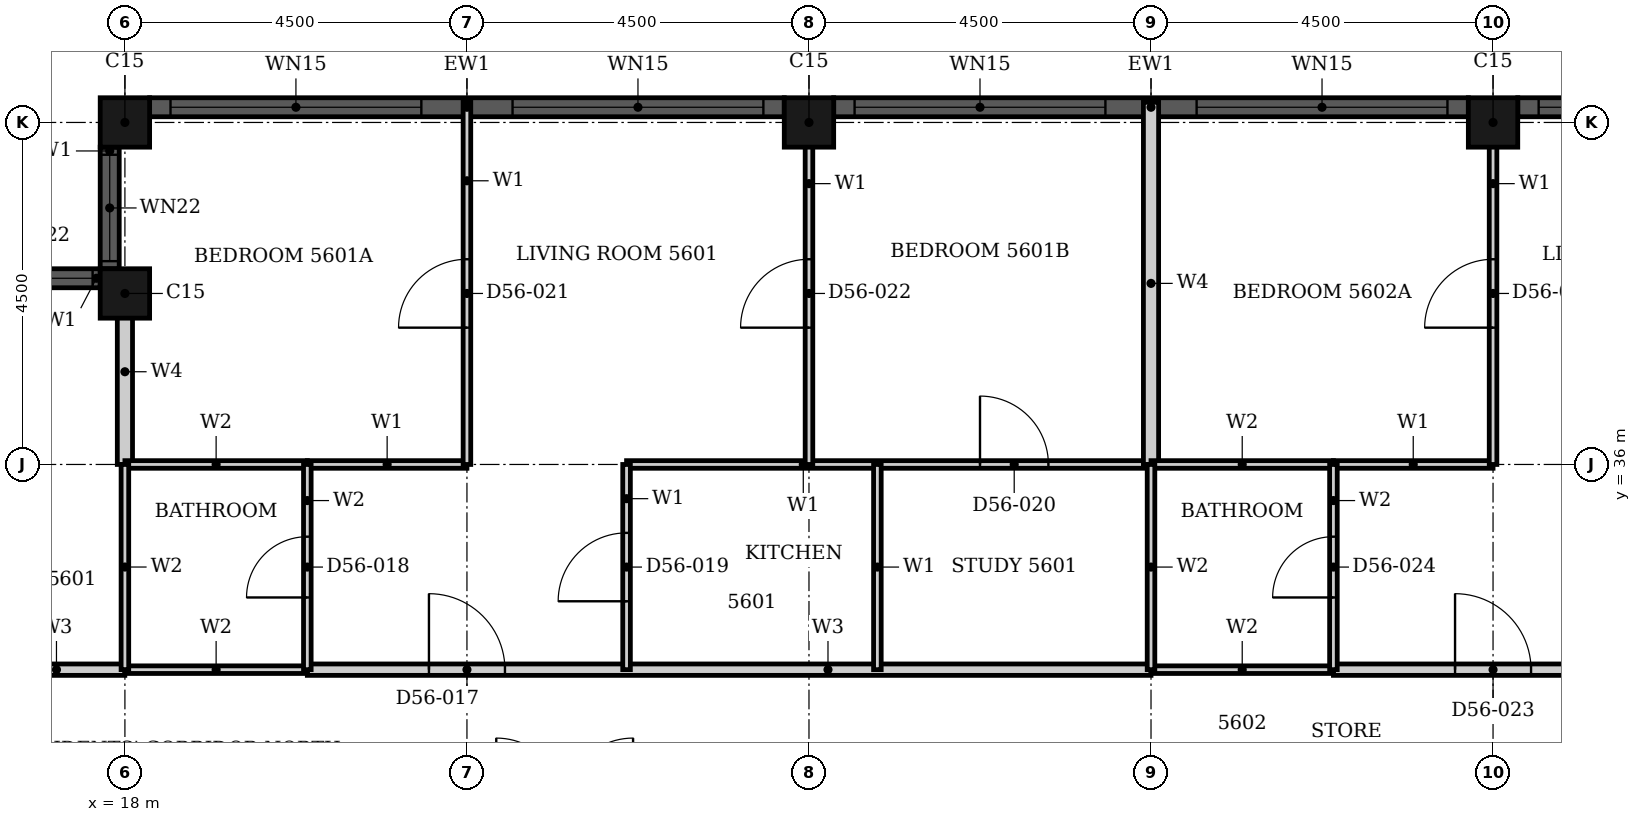
"""IFC4 building model, lengths in metres.
Left out: names, types, materials, properties, quantities, classifications, styles, units other than length and angle.
Written with IfcOpenShell. Run it as: python <this file> out.ifc"""

import sys

from ifc_helpers import new_model, si_unit, direction, frame, frame_2d, origin, origin_2d, place, context, subcontext, project, spatial, rectangle, hollow_rectangle, extrude, element, fill, save


model = new_model("IFC4")
c1 = context("Model", 3, precision=1e-05, world=origin(), true_north=direction((0.0, 1.0)))
c2 = subcontext(c1, "Body", "Model", "MODEL_VIEW")
j1 = project(units=[si_unit("LENGTHUNIT", "METRE"), si_unit("PLANEANGLEUNIT", "RADIAN")], contexts=[c1])
p1 = place(None, origin())
s1 = spatial("IfcSite", under=j1, at=p1, CompositionType="ELEMENT")
p2 = place(p1, origin())
s2 = spatial("IfcBuilding", under=s1, at=p2, CompositionType="ELEMENT")
p3 = place(p2, frame((0.0, 0.0, 222.0)))
s3 = spatial("IfcBuildingStorey", under=s2, at=p3, CompositionType="ELEMENT", Elevation=222.0)
for number, where, z_axis, x_axis in (
    (1, (36.0, 40.5, 0.0), (0.0, 0.0, 1.0), (1.0, 0.0, 0.0)),
    (2, (27.0, 40.5, 0.0), (0.0, 0.0, 1.0), (1.0, 0.0, 0.0)),
    (3, (18.0, 40.5, 0.0), (0.0, 0.0, 1.0), (1.0, 0.0, 0.0)),
    (4, (18.0, 38.25, 0.0), (0.0, 0.0, 1.0), (1.0, 0.0, 0.0)),
):
    element("IfcColumn", number, at=place(p3, frame(where, z_axis=z_axis, x_axis=x_axis)), inside=s3, PredefinedType="COLUMN", context=c2, shape_type="SweptSolid", body=[
        extrude(hollow_rectangle(XDim=0.65, YDim=0.65, WallThickness=0.021, at=origin_2d()), origin(), (0.0, 0.0, 1.0), 3.7),
    ])
p4 = place(p3, frame((44.675, 40.7, 0.0), z_axis=(0.0, 0.0, 1.0), x_axis=(-1.0, 0.0, 0.0)))
e5 = element("IfcWall", 5, at=p4, inside=s3, PredefinedType="SOLIDWALL", context=c2, shape_type="SweptSolid", body=[
    extrude(rectangle(XDim=8.35, YDim=0.25, at=frame_2d((4.175, 0.0))), origin(), (0.0, 0.0, 1.0), 3.7),
])
p5 = place(p4, frame((0.275, 0.0, 0.45)))
e6 = element("IfcOpeningElement", 6, at=p5, cuts=e5, PredefinedType="OPENING", context=c2, shape_type="SweptSolid", body=[
    extrude(rectangle(XDim=3.3, YDim=2.3, at=frame_2d((1.65, 1.15))), frame((0.0, 0.135, 0.0), z_axis=(0.0, -1.0, 0.0), x_axis=(1.0, 0.0, 0.0)), (0.0, 0.0, 1.0), 0.27),
])
p6 = place(p4, frame((4.775, 0.0, 0.45)))
e7 = element("IfcOpeningElement", 7, at=p6, cuts=e5, PredefinedType="OPENING", context=c2, shape_type="SweptSolid", body=[
    extrude(rectangle(XDim=3.3, YDim=2.3, at=frame_2d((1.65, 1.15))), frame((0.0, 0.135, 0.0), z_axis=(0.0, -1.0, 0.0), x_axis=(1.0, 0.0, 0.0)), (0.0, 0.0, 1.0), 0.27),
])
p7 = place(p3, frame((35.675, 40.7, 0.0), z_axis=(0.0, 0.0, 1.0), x_axis=(-1.0, 0.0, 0.0)))
e8 = element("IfcWall", 8, at=p7, inside=s3, PredefinedType="SOLIDWALL", context=c2, shape_type="SweptSolid", body=[
    extrude(rectangle(XDim=8.35, YDim=0.25, at=frame_2d((4.175, 0.0))), origin(), (0.0, 0.0, 1.0), 3.7),
])
p8 = place(p7, frame((0.275, 0.0, 0.45)))
e9 = element("IfcOpeningElement", 9, at=p8, cuts=e8, PredefinedType="OPENING", context=c2, shape_type="SweptSolid", body=[
    extrude(rectangle(XDim=3.3, YDim=2.3, at=frame_2d((1.65, 1.15))), frame((0.0, 0.135, 0.0), z_axis=(0.0, -1.0, 0.0), x_axis=(1.0, 0.0, 0.0)), (0.0, 0.0, 1.0), 0.27),
])
p9 = place(p7, frame((4.775, 0.0, 0.45)))
e10 = element("IfcOpeningElement", 10, at=p9, cuts=e8, PredefinedType="OPENING", context=c2, shape_type="SweptSolid", body=[
    extrude(rectangle(XDim=3.3, YDim=2.3, at=frame_2d((1.65, 1.15))), frame((0.0, 0.135, 0.0), z_axis=(0.0, -1.0, 0.0), x_axis=(1.0, 0.0, 0.0)), (0.0, 0.0, 1.0), 0.27),
])
p10 = place(p3, frame((26.675, 40.7, 0.0), z_axis=(0.0, 0.0, 1.0), x_axis=(-1.0, 0.0, 0.0)))
e11 = element("IfcWall", 11, at=p10, inside=s3, PredefinedType="SOLIDWALL", context=c2, shape_type="SweptSolid", body=[
    extrude(rectangle(XDim=8.35, YDim=0.25, at=frame_2d((4.175, 0.0))), origin(), (0.0, 0.0, 1.0), 3.7),
])
p11 = place(p10, frame((0.275, 0.0, 0.45)))
e12 = element("IfcOpeningElement", 12, at=p11, cuts=e11, PredefinedType="OPENING", context=c2, shape_type="SweptSolid", body=[
    extrude(rectangle(XDim=3.3, YDim=2.3, at=frame_2d((1.65, 1.15))), frame((0.0, 0.135, 0.0), z_axis=(0.0, -1.0, 0.0), x_axis=(1.0, 0.0, 0.0)), (0.0, 0.0, 1.0), 0.27),
])
p12 = place(p10, frame((4.775, 0.0, 0.45)))
e13 = element("IfcOpeningElement", 13, at=p12, cuts=e11, PredefinedType="OPENING", context=c2, shape_type="SweptSolid", body=[
    extrude(rectangle(XDim=3.3, YDim=2.3, at=frame_2d((1.65, 1.15))), frame((0.0, 0.135, 0.0), z_axis=(0.0, -1.0, 0.0), x_axis=(1.0, 0.0, 0.0)), (0.0, 0.0, 1.0), 0.27),
])
p13 = place(p3, frame((17.8, 40.175, 0.0), z_axis=(0.0, 0.0, 1.0), x_axis=(0.0, -1.0, 0.0)))
e14 = element("IfcWall", 14, at=p13, inside=s3, PredefinedType="SOLIDWALL", context=c2, shape_type="SweptSolid", body=[
    extrude(rectangle(XDim=1.6, YDim=0.25, at=frame_2d((0.8, 0.0))), origin(), (0.0, 0.0, 1.0), 3.7),
])
p14 = place(p13, frame((0.1, 0.0, 0.9)))
e15 = element("IfcOpeningElement", 15, at=p14, cuts=e14, PredefinedType="OPENING", context=c2, shape_type="SweptSolid", body=[
    extrude(rectangle(XDim=1.4, YDim=1.85, at=frame_2d((0.7, 0.925))), frame((0.0, 0.135, 0.0), z_axis=(0.0, -1.0, 0.0), x_axis=(1.0, 0.0, 0.0)), (0.0, 0.0, 1.0), 0.27),
])
p15 = place(p3, frame((17.675, 38.45, 0.0), z_axis=(0.0, 0.0, 1.0), x_axis=(-1.0, 0.0, 0.0)))
e16 = element("IfcWall", 16, at=p15, inside=s3, PredefinedType="SOLIDWALL", context=c2, shape_type="SweptSolid", body=[
    extrude(rectangle(XDim=1.6, YDim=0.25, at=frame_2d((0.8, 0.0))), origin(), (0.0, 0.0, 1.0), 3.7),
])
p16 = place(p15, frame((0.1, 0.0, 0.9)))
e17 = element("IfcOpeningElement", 17, at=p16, cuts=e16, PredefinedType="OPENING", context=c2, shape_type="SweptSolid", body=[
    extrude(rectangle(XDim=1.4, YDim=1.85, at=frame_2d((0.7, 0.925))), frame((0.0, 0.135, 0.0), z_axis=(0.0, -1.0, 0.0), x_axis=(1.0, 0.0, 0.0)), (0.0, 0.0, 1.0), 0.27),
])
p17 = place(p3, frame((20.4, 33.3, 0.0), z_axis=(0.0, 0.0, 1.0), x_axis=(1.0, 0.0, 0.0)))
e18 = element("IfcWall", 18, at=p17, inside=s3, PredefinedType="PARTITIONING", context=c2, shape_type="SweptSolid", body=[
    extrude(rectangle(XDim=11.1, YDim=0.15, at=frame_2d((5.55, 0.0))), origin(), (0.0, 0.0, 1.0), 3.4),
])
p18 = place(p17, frame((1.6, 0.0, 0.0)))
e19 = element("IfcOpeningElement", 19, at=p18, cuts=e18, PredefinedType="OPENING", context=c2, shape_type="SweptSolid", body=[
    extrude(rectangle(XDim=1.0, YDim=2.2, at=frame_2d((0.5, 1.1))), frame((0.0, 0.085, 0.0), z_axis=(0.0, -1.0, 0.0), x_axis=(1.0, 0.0, 0.0)), (0.0, 0.0, 1.0), 0.17),
])
p19 = place(p3, frame((33.9, 33.3, 0.0), z_axis=(0.0, 0.0, 1.0), x_axis=(1.0, 0.0, 0.0)))
e20 = element("IfcWall", 20, at=p19, inside=s3, PredefinedType="PARTITIONING", context=c2, shape_type="SweptSolid", body=[
    extrude(rectangle(XDim=11.1, YDim=0.15, at=frame_2d((5.55, 0.0))), origin(), (0.0, 0.0, 1.0), 3.4),
])
p20 = place(p19, frame((1.6, 0.0, 0.0)))
e21 = element("IfcOpeningElement", 21, at=p20, cuts=e20, PredefinedType="OPENING", context=c2, shape_type="SweptSolid", body=[
    extrude(rectangle(XDim=1.0, YDim=2.2, at=frame_2d((0.5, 1.1))), frame((0.0, 0.085, 0.0), z_axis=(0.0, -1.0, 0.0), x_axis=(1.0, 0.0, 0.0)), (0.0, 0.0, 1.0), 0.17),
])
p21 = place(p3, frame((16.2, 33.3, 0.0), z_axis=(0.0, 0.0, 1.0), x_axis=(1.0, 0.0, 0.0)))
e22 = element("IfcWall", 22, at=p21, inside=s3, PredefinedType="PARTITIONING", context=c2, shape_type="SweptSolid", body=[
    extrude(rectangle(XDim=1.799, YDim=0.15, at=frame_2d((0.899, 0.0))), origin(), (0.0, 0.0, 1.0), 3.4),
])
p22 = place(p3, frame((20.4, 36.0, 0.0), z_axis=(0.0, 0.0, 1.0), x_axis=(1.0, 0.0, 0.0)))
e23 = element("IfcWall", 23, at=p22, inside=s3, PredefinedType="PARTITIONING", context=c2, shape_type="SweptSolid", body=[
    extrude(rectangle(XDim=2.1, YDim=0.1, at=frame_2d((1.05, 0.0))), origin(), (0.0, 0.0, 1.0), 3.4),
])
p23 = place(p3, frame((24.6, 36.0, 0.0), z_axis=(0.0, 0.0, 1.0), x_axis=(1.0, 0.0, 0.0)))
e24 = element("IfcWall", 24, at=p23, inside=s3, PredefinedType="PARTITIONING", context=c2, shape_type="SweptSolid", body=[
    extrude(rectangle(XDim=6.9, YDim=0.1, at=frame_2d((3.45, 0.0))), origin(), (0.0, 0.0, 1.0), 3.4),
])
p24 = place(p23, frame((4.65, 0.0, 0.0)))
e25 = element("IfcOpeningElement", 25, at=p24, cuts=e24, PredefinedType="OPENING", context=c2, shape_type="SweptSolid", body=[
    extrude(rectangle(XDim=0.9, YDim=2.1, at=frame_2d((0.45, 1.05))), frame((0.0, 0.06, 0.0), z_axis=(0.0, -1.0, 0.0), x_axis=(1.0, 0.0, 0.0)), (0.0, 0.0, 1.0), 0.12),
])
p25 = place(p3, frame((33.9, 36.0, 0.0), z_axis=(0.0, 0.0, 1.0), x_axis=(1.0, 0.0, 0.0)))
e26 = element("IfcWall", 26, at=p25, inside=s3, PredefinedType="PARTITIONING", context=c2, shape_type="SweptSolid", body=[
    extrude(rectangle(XDim=2.1, YDim=0.1, at=frame_2d((1.05, 0.0))), origin(), (0.0, 0.0, 1.0), 3.4),
])
p26 = place(p3, frame((22.5, 36.0, 0.0), z_axis=(0.0, 0.0, 1.0), x_axis=(0.0, 1.0, 0.0)))
e27 = element("IfcWall", 27, at=p26, inside=s3, PredefinedType="PARTITIONING", context=c2, shape_type="SweptSolid", body=[
    extrude(rectangle(XDim=4.765, YDim=0.1, at=frame_2d((2.382, 0.0))), origin(), (0.0, 0.0, 1.0), 3.4),
])
p27 = place(p26, frame((1.8, 0.0, 0.0)))
e28 = element("IfcOpeningElement", 28, at=p27, cuts=e27, PredefinedType="OPENING", context=c2, shape_type="SweptSolid", body=[
    extrude(rectangle(XDim=0.9, YDim=2.1, at=frame_2d((0.45, 1.05))), frame((0.0, 0.06, 0.0), z_axis=(0.0, -1.0, 0.0), x_axis=(1.0, 0.0, 0.0)), (0.0, 0.0, 1.0), 0.12),
])
p28 = place(p3, frame((24.6, 33.3, 0.0), z_axis=(0.0, 0.0, 1.0), x_axis=(0.0, 1.0, 0.0)))
e29 = element("IfcWall", 29, at=p28, inside=s3, PredefinedType="PARTITIONING", context=c2, shape_type="SweptSolid", body=[
    extrude(rectangle(XDim=2.7, YDim=0.1, at=frame_2d((1.35, 0.0))), origin(), (0.0, 0.0, 1.0), 3.4),
])
p29 = place(p28, frame((0.9, 0.0, 0.0)))
e30 = element("IfcOpeningElement", 30, at=p29, cuts=e29, PredefinedType="OPENING", context=c2, shape_type="SweptSolid", body=[
    extrude(rectangle(XDim=0.9, YDim=2.1, at=frame_2d((0.45, 1.05))), frame((0.0, 0.06, 0.0), z_axis=(0.0, -1.0, 0.0), x_axis=(1.0, 0.0, 0.0)), (0.0, 0.0, 1.0), 0.12),
])
p30 = place(p3, frame((27.0, 36.0, 0.0), z_axis=(0.0, 0.0, 1.0), x_axis=(0.0, 1.0, 0.0)))
e31 = element("IfcWall", 31, at=p30, inside=s3, PredefinedType="PARTITIONING", context=c2, shape_type="SweptSolid", body=[
    extrude(rectangle(XDim=4.69, YDim=0.1, at=frame_2d((2.345, 0.0))), origin(), (0.0, 0.0, 1.0), 3.4),
])
p31 = place(p30, frame((1.8, 0.0, 0.0)))
e32 = element("IfcOpeningElement", 32, at=p31, cuts=e31, PredefinedType="OPENING", context=c2, shape_type="SweptSolid", body=[
    extrude(rectangle(XDim=0.9, YDim=2.1, at=frame_2d((0.45, 1.05))), frame((0.0, 0.06, 0.0), z_axis=(0.0, -1.0, 0.0), x_axis=(1.0, 0.0, 0.0)), (0.0, 0.0, 1.0), 0.12),
])
p32 = place(p3, frame((27.9, 33.3, 0.0), z_axis=(0.0, 0.0, 1.0), x_axis=(0.0, 1.0, 0.0)))
e33 = element("IfcWall", 33, at=p32, inside=s3, PredefinedType="PARTITIONING", context=c2, shape_type="SweptSolid", body=[
    extrude(rectangle(XDim=2.7, YDim=0.1, at=frame_2d((1.35, 0.0))), origin(), (0.0, 0.0, 1.0), 3.4),
])
p33 = place(p3, frame((36.0, 36.0, 0.0), z_axis=(0.0, 0.0, 1.0), x_axis=(0.0, 1.0, 0.0)))
e34 = element("IfcWall", 34, at=p33, inside=s3, PredefinedType="PARTITIONING", context=c2, shape_type="SweptSolid", body=[
    extrude(rectangle(XDim=4.69, YDim=0.1, at=frame_2d((2.345, 0.0))), origin(), (0.0, 0.0, 1.0), 3.4),
])
p34 = place(p33, frame((1.8, 0.0, 0.0)))
e35 = element("IfcOpeningElement", 35, at=p34, cuts=e34, PredefinedType="OPENING", context=c2, shape_type="SweptSolid", body=[
    extrude(rectangle(XDim=0.9, YDim=2.1, at=frame_2d((0.45, 1.05))), frame((0.0, 0.06, 0.0), z_axis=(0.0, -1.0, 0.0), x_axis=(1.0, 0.0, 0.0)), (0.0, 0.0, 1.0), 0.12),
])
p35 = place(p3, frame((18.0, 36.0, 0.0), z_axis=(0.0, 0.0, 1.0), x_axis=(0.0, 1.0, 0.0)))
e36 = element("IfcWall", 36, at=p35, inside=s3, PredefinedType="PARTITIONING", context=c2, shape_type="SweptSolid", body=[
    extrude(rectangle(XDim=2.44, YDim=0.2, at=frame_2d((1.22, 0.0))), origin(), (0.0, 0.0, 1.0), 3.4),
])
p36 = place(p3, frame((31.5, 36.0, 0.0), z_axis=(0.0, 0.0, 1.0), x_axis=(0.0, 1.0, 0.0)))
e37 = element("IfcWall", 37, at=p36, inside=s3, PredefinedType="PARTITIONING", context=c2, shape_type="SweptSolid", body=[
    extrude(rectangle(XDim=4.765, YDim=0.2, at=frame_2d((2.382, 0.0))), origin(), (0.0, 0.0, 1.0), 3.4),
])
for number, where, z_axis, x_axis in (
    (38, (18.0, 33.3, 0.0), (0.0, 0.0, 1.0), (1.0, 0.0, 0.0)),
    (39, (31.5, 33.3, 0.0), (0.0, 0.0, 1.0), (1.0, 0.0, 0.0)),
    (40, (18.0, 36.0, 0.0), (0.0, 0.0, 1.0), (1.0, 0.0, 0.0)),
    (41, (31.5, 36.0, 0.0), (0.0, 0.0, 1.0), (1.0, 0.0, 0.0)),
):
    element("IfcWall", number, at=place(p3, frame(where, z_axis=z_axis, x_axis=x_axis)), inside=s3, PredefinedType="PARTITIONING", context=c2, shape_type="SweptSolid", body=[
        extrude(rectangle(XDim=2.4, YDim=0.1, at=frame_2d((1.2, 0.0))), origin(), (0.0, 0.0, 1.0), 3.4),
    ])
p37 = place(p3, frame((18.0, 33.301, 0.0), z_axis=(0.0, 0.0, 1.0), x_axis=(0.0, 1.0, 0.0)))
e42 = element("IfcWall", 42, at=p37, inside=s3, PredefinedType="PARTITIONING", context=c2, shape_type="SweptSolid", body=[
    extrude(rectangle(XDim=2.699, YDim=0.1, at=frame_2d((1.35, 0.0))), origin(), (0.0, 0.0, 1.0), 3.4),
])
p38 = place(p3, frame((20.4, 33.3, 0.0), z_axis=(0.0, 0.0, 1.0), x_axis=(0.0, 1.0, 0.0)))
e43 = element("IfcWall", 43, at=p38, inside=s3, PredefinedType="PARTITIONING", context=c2, shape_type="SweptSolid", body=[
    extrude(rectangle(XDim=2.7, YDim=0.1, at=frame_2d((1.35, 0.0))), origin(), (0.0, 0.0, 1.0), 3.4),
])
p39 = place(p38, frame((0.95, 0.0, 0.0)))
e44 = element("IfcOpeningElement", 44, at=p39, cuts=e43, PredefinedType="OPENING", context=c2, shape_type="SweptSolid", body=[
    extrude(rectangle(XDim=0.8, YDim=2.1, at=frame_2d((0.4, 1.05))), frame((0.0, 0.06, 0.0), z_axis=(0.0, -1.0, 0.0), x_axis=(1.0, 0.0, 0.0)), (0.0, 0.0, 1.0), 0.12),
])
p40 = place(p3, frame((31.5, 33.3, 0.0), z_axis=(0.0, 0.0, 1.0), x_axis=(0.0, 1.0, 0.0)))
e45 = element("IfcWall", 45, at=p40, inside=s3, PredefinedType="PARTITIONING", context=c2, shape_type="SweptSolid", body=[
    extrude(rectangle(XDim=2.7, YDim=0.1, at=frame_2d((1.35, 0.0))), origin(), (0.0, 0.0, 1.0), 3.4),
])
p41 = place(p3, frame((33.9, 33.3, 0.0), z_axis=(0.0, 0.0, 1.0), x_axis=(0.0, 1.0, 0.0)))
e46 = element("IfcWall", 46, at=p41, inside=s3, PredefinedType="PARTITIONING", context=c2, shape_type="SweptSolid", body=[
    extrude(rectangle(XDim=2.7, YDim=0.1, at=frame_2d((1.35, 0.0))), origin(), (0.0, 0.0, 1.0), 3.4),
])
p42 = place(p41, frame((0.95, 0.0, 0.0)))
e47 = element("IfcOpeningElement", 47, at=p42, cuts=e46, PredefinedType="OPENING", context=c2, shape_type="SweptSolid", body=[
    extrude(rectangle(XDim=0.8, YDim=2.1, at=frame_2d((0.4, 1.05))), frame((0.0, 0.06, 0.0), z_axis=(0.0, -1.0, 0.0), x_axis=(1.0, 0.0, 0.0)), (0.0, 0.0, 1.0), 0.12),
])
p43 = place(p6, origin())
e48 = element("IfcWindow", 48, at=p43, inside=s3, PartitioningType="SINGLE_PANEL", PredefinedType="WINDOW", context=c2, shape_type="SweptSolid", body=[
    extrude(rectangle(XDim=3.3, YDim=2.3, at=frame_2d((1.65, 1.15))), frame((0.0, 0.03, 0.0), z_axis=(0.0, -1.0, 0.0), x_axis=(1.0, 0.0, 0.0)), (0.0, 0.0, 1.0), 0.06),
])
fill(e7, e48)
p44 = place(p8, origin())
e49 = element("IfcWindow", 49, at=p44, inside=s3, PartitioningType="SINGLE_PANEL", PredefinedType="WINDOW", context=c2, shape_type="SweptSolid", body=[
    extrude(rectangle(XDim=3.3, YDim=2.3, at=frame_2d((1.65, 1.15))), frame((0.0, 0.03, 0.0), z_axis=(0.0, -1.0, 0.0), x_axis=(1.0, 0.0, 0.0)), (0.0, 0.0, 1.0), 0.06),
])
fill(e9, e49)
p45 = place(p9, origin())
e50 = element("IfcWindow", 50, at=p45, inside=s3, PartitioningType="SINGLE_PANEL", PredefinedType="WINDOW", context=c2, shape_type="SweptSolid", body=[
    extrude(rectangle(XDim=3.3, YDim=2.3, at=frame_2d((1.65, 1.15))), frame((0.0, 0.03, 0.0), z_axis=(0.0, -1.0, 0.0), x_axis=(1.0, 0.0, 0.0)), (0.0, 0.0, 1.0), 0.06),
])
fill(e10, e50)
p46 = place(p11, origin())
e51 = element("IfcWindow", 51, at=p46, inside=s3, PartitioningType="SINGLE_PANEL", PredefinedType="WINDOW", context=c2, shape_type="SweptSolid", body=[
    extrude(rectangle(XDim=3.3, YDim=2.3, at=frame_2d((1.65, 1.15))), frame((0.0, 0.03, 0.0), z_axis=(0.0, -1.0, 0.0), x_axis=(1.0, 0.0, 0.0)), (0.0, 0.0, 1.0), 0.06),
])
fill(e12, e51)
p47 = place(p12, origin())
e52 = element("IfcWindow", 52, at=p47, inside=s3, PartitioningType="SINGLE_PANEL", PredefinedType="WINDOW", context=c2, shape_type="SweptSolid", body=[
    extrude(rectangle(XDim=3.3, YDim=2.3, at=frame_2d((1.65, 1.15))), frame((0.0, 0.03, 0.0), z_axis=(0.0, -1.0, 0.0), x_axis=(1.0, 0.0, 0.0)), (0.0, 0.0, 1.0), 0.06),
])
fill(e13, e52)
p48 = place(p14, origin())
e53 = element("IfcWindow", 53, at=p48, inside=s3, PartitioningType="SINGLE_PANEL", PredefinedType="WINDOW", context=c2, shape_type="SweptSolid", body=[
    extrude(rectangle(XDim=1.4, YDim=1.85, at=frame_2d((0.7, 0.925))), frame((0.0, 0.03, 0.0), z_axis=(0.0, -1.0, 0.0), x_axis=(1.0, 0.0, 0.0)), (0.0, 0.0, 1.0), 0.06),
])
fill(e15, e53)
p49 = place(p16, origin())
e54 = element("IfcWindow", 54, at=p49, inside=s3, PartitioningType="SINGLE_PANEL", PredefinedType="WINDOW", context=c2, shape_type="SweptSolid", body=[
    extrude(rectangle(XDim=1.4, YDim=1.85, at=frame_2d((0.7, 0.925))), frame((0.0, 0.03, 0.0), z_axis=(0.0, -1.0, 0.0), x_axis=(1.0, 0.0, 0.0)), (0.0, 0.0, 1.0), 0.06),
])
fill(e17, e54)
p50 = place(p18, origin())
e55 = element("IfcDoor", 55, at=p50, inside=s3, OperationType="SINGLE_SWING_RIGHT", PredefinedType="DOOR", context=c2, shape_type="SweptSolid", body=[
    extrude(rectangle(XDim=1.0, YDim=2.2, at=frame_2d((0.5, 1.1))), frame((0.0, 0.025, 0.0), z_axis=(0.0, -1.0, 0.0), x_axis=(1.0, 0.0, 0.0)), (0.0, 0.0, 1.0), 0.05),
])
fill(e19, e55)
p51 = place(p39, origin())
e56 = element("IfcDoor", 56, at=p51, inside=s3, OperationType="SINGLE_SWING_LEFT", PredefinedType="DOOR", context=c2, shape_type="SweptSolid", body=[
    extrude(rectangle(XDim=0.8, YDim=2.1, at=frame_2d((0.4, 1.05))), frame((0.0, 0.025, 0.0), z_axis=(0.0, -1.0, 0.0), x_axis=(1.0, 0.0, 0.0)), (0.0, 0.0, 1.0), 0.05),
])
fill(e44, e56)
p52 = place(p29, origin())
e57 = element("IfcDoor", 57, at=p52, inside=s3, OperationType="SINGLE_SWING_LEFT", PredefinedType="DOOR", context=c2, shape_type="SweptSolid", body=[
    extrude(rectangle(XDim=0.9, YDim=2.1, at=frame_2d((0.45, 1.05))), frame((0.0, 0.025, 0.0), z_axis=(0.0, -1.0, 0.0), x_axis=(1.0, 0.0, 0.0)), (0.0, 0.0, 1.0), 0.05),
])
fill(e30, e57)
p53 = place(p24, origin())
e58 = element("IfcDoor", 58, at=p53, inside=s3, OperationType="SINGLE_SWING_LEFT", PredefinedType="DOOR", context=c2, shape_type="SweptSolid", body=[
    extrude(rectangle(XDim=0.9, YDim=2.1, at=frame_2d((0.45, 1.05))), frame((0.0, 0.025, 0.0), z_axis=(0.0, -1.0, 0.0), x_axis=(1.0, 0.0, 0.0)), (0.0, 0.0, 1.0), 0.05),
])
fill(e25, e58)
p54 = place(p27, origin())
e59 = element("IfcDoor", 59, at=p54, inside=s3, OperationType="SINGLE_SWING_RIGHT", PredefinedType="DOOR", context=c2, shape_type="SweptSolid", body=[
    extrude(rectangle(XDim=0.9, YDim=2.1, at=frame_2d((0.45, 1.05))), frame((0.0, 0.025, 0.0), z_axis=(0.0, -1.0, 0.0), x_axis=(1.0, 0.0, 0.0)), (0.0, 0.0, 1.0), 0.05),
])
fill(e28, e59)
p55 = place(p31, origin())
e60 = element("IfcDoor", 60, at=p55, inside=s3, OperationType="SINGLE_SWING_LEFT", PredefinedType="DOOR", context=c2, shape_type="SweptSolid", body=[
    extrude(rectangle(XDim=0.9, YDim=2.1, at=frame_2d((0.45, 1.05))), frame((0.0, 0.025, 0.0), z_axis=(0.0, -1.0, 0.0), x_axis=(1.0, 0.0, 0.0)), (0.0, 0.0, 1.0), 0.05),
])
fill(e32, e60)
p56 = place(p20, origin())
e61 = element("IfcDoor", 61, at=p56, inside=s3, OperationType="SINGLE_SWING_RIGHT", PredefinedType="DOOR", context=c2, shape_type="SweptSolid", body=[
    extrude(rectangle(XDim=1.0, YDim=2.2, at=frame_2d((0.5, 1.1))), frame((0.0, 0.025, 0.0), z_axis=(0.0, -1.0, 0.0), x_axis=(1.0, 0.0, 0.0)), (0.0, 0.0, 1.0), 0.05),
])
fill(e21, e61)
p57 = place(p42, origin())
e62 = element("IfcDoor", 62, at=p57, inside=s3, OperationType="SINGLE_SWING_RIGHT", PredefinedType="DOOR", context=c2, shape_type="SweptSolid", body=[
    extrude(rectangle(XDim=0.8, YDim=2.1, at=frame_2d((0.4, 1.05))), frame((0.0, 0.025, 0.0), z_axis=(0.0, -1.0, 0.0), x_axis=(1.0, 0.0, 0.0)), (0.0, 0.0, 1.0), 0.05),
])
fill(e47, e62)
p58 = place(p34, origin())
e63 = element("IfcDoor", 63, at=p58, inside=s3, OperationType="SINGLE_SWING_RIGHT", PredefinedType="DOOR", context=c2, shape_type="SweptSolid", body=[
    extrude(rectangle(XDim=0.9, YDim=2.1, at=frame_2d((0.45, 1.05))), frame((0.0, 0.025, 0.0), z_axis=(0.0, -1.0, 0.0), x_axis=(1.0, 0.0, 0.0)), (0.0, 0.0, 1.0), 0.05),
])
fill(e35, e63)
save(model, sys.argv[1])
